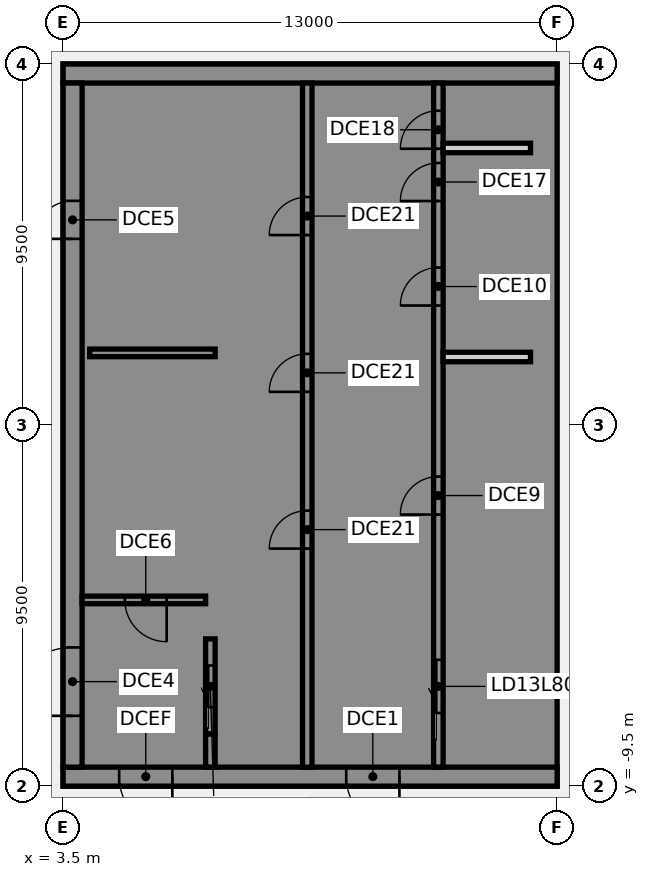
"""IFC4 building model, lengths in metres.
Left out: names, types, materials, properties, quantities, classifications, styles, units other than length and angle.
Written with IfcOpenShell. Run it as: python <this file> out.ifc"""

import sys

from ifc_helpers import new_model, si_unit, direction, frame, frame_2d, origin, place, context, subcontext, project, spatial, polyline, rectangle, outline, extrude, element, fill, save


model = new_model("IFC4")
c1 = context("Model", 3, precision=1e-05, world=origin(), true_north=direction((0.0, 1.0)))
c2 = subcontext(c1, "Body", "Model", "MODEL_VIEW")
j1 = project(units=[si_unit("LENGTHUNIT", "METRE"), si_unit("PLANEANGLEUNIT", "RADIAN")], contexts=[c1])
p1 = place(None, origin())
s1 = spatial("IfcSite", under=j1, at=p1, CompositionType="ELEMENT")
p2 = place(p1, origin())
s2 = spatial("IfcBuilding", under=s1, at=p2, CompositionType="ELEMENT")
p3 = place(p2, frame((0.0, 0.0, 325.4)))
s3 = spatial("IfcBuildingStorey", under=s2, at=p3, CompositionType="ELEMENT", Elevation=325.4)
p4 = place(p3, frame((16.5, -9.25, 0.0), z_axis=(0.0, 0.0, 1.0), x_axis=(-1.0, 0.0, 0.0)))
e1 = element("IfcWall", 1, at=p4, inside=s3, PredefinedType="SHEAR", context=c2, shape_type="SweptSolid", body=[
    extrude(rectangle(XDim=13.0, YDim=0.5, at=frame_2d((6.5, 0.0))), origin(), (0.0, 0.0, 1.0), 3.8),
])
p5 = place(p4, frame((4.15, 0.0, 0.0)))
e2 = element("IfcOpeningElement", 2, at=p5, cuts=e1, PredefinedType="OPENING", context=c2, shape_type="SweptSolid", body=[
    extrude(rectangle(XDim=1.4, YDim=2.1, at=frame_2d((0.7, 1.05))), frame((0.0, 0.26, 0.0), z_axis=(0.0, -1.0, 0.0), x_axis=(1.0, 0.0, 0.0)), (0.0, 0.0, 1.0), 0.52),
])
p6 = place(p4, frame((10.125, 0.0, 0.0)))
e3 = element("IfcOpeningElement", 3, at=p6, cuts=e1, PredefinedType="OPENING", context=c2, shape_type="SweptSolid", body=[
    extrude(rectangle(XDim=1.4, YDim=2.1, at=frame_2d((0.7, 1.05))), frame((0.0, 0.26, 0.0), z_axis=(0.0, -1.0, 0.0), x_axis=(1.0, 0.0, 0.0)), (0.0, 0.0, 1.0), 0.52),
])
p7 = place(p3, origin())
e4 = element("IfcWall", 4, at=p7, inside=s3, PredefinedType="SHEAR", context=c2, shape_type="SweptSolid", body=[
    extrude(outline(polyline([(13.5, -8.125), (13.5, -9.0), (16.0, -9.0), (16.5, -9.0), (16.5, 9.0), (16.0, 9.0), (13.5, 9.0), (13.5, 8.125), (16.0, 8.125), (16.0, -5.375), (13.5, -5.375), (13.5, -5.625), (16.0, -5.625), (16.0, -8.125), (13.5, -8.125)])), origin(), (0.0, 0.0, 1.0), 3.8),
])
p8 = place(p3, frame((16.5, 9.25, 0.0), z_axis=(0.0, 0.0, 1.0), x_axis=(-1.0, 0.0, 0.0)))
e5 = element("IfcWall", 5, at=p8, inside=s3, PredefinedType="SHEAR", context=c2, shape_type="SweptSolid", body=[
    extrude(rectangle(XDim=13.0, YDim=0.5, at=frame_2d((6.5, 0.0))), origin(), (0.0, 0.0, 1.0), 3.8),
])
p9 = place(p3, origin())
e6 = element("IfcWall", 6, at=p9, inside=s3, PredefinedType="SHEAR", context=c2, shape_type="SweptSolid", body=[
    extrude(outline(polyline([(9.8, -5.625), (9.8, -5.375), (7.5, -5.375), (7.5, 8.125), (9.8, 8.125), (9.8, 9.0), (7.5, 9.0), (7.25, 9.0), (7.25, -5.625), (7.5, -5.625), (9.8, -5.625)])), origin(), (0.0, 0.0, 1.0), 3.8),
])
p10 = place(p3, origin())
e7 = element("IfcWall", 7, at=p10, inside=s3, PredefinedType="SHEAR", context=c2, shape_type="SweptSolid", body=[
    extrude(outline(polyline([(7.5, -8.125), (7.5, -9.0), (9.8, -9.0), (9.8, -8.125), (9.8, -5.625), (9.55, -5.625), (9.55, -8.125), (7.5, -8.125)])), origin(), (0.0, 0.0, 1.0), 3.8),
])
p11 = place(p3, frame((7.375, -9.0, 0.0), z_axis=(0.0, 0.0, 1.0), x_axis=(0.0, 1.0, 0.0)))
e8 = element("IfcWall", 8, at=p11, inside=s3, PredefinedType="SHEAR", context=c2, shape_type="SweptSolid", body=[
    extrude(rectangle(XDim=0.875, YDim=0.25, at=frame_2d((0.438, 0.0))), origin(), (0.0, 0.0, 1.0), 3.8),
])
p12 = place(p3, frame((7.5, 1.9, 0.0), z_axis=(0.0, 0.0, 1.0), x_axis=(-1.0, 0.0, 0.0)))
e9 = element("IfcWall", 9, at=p12, inside=s3, PredefinedType="SHEAR", context=c2, shape_type="SweptSolid", body=[
    extrude(rectangle(XDim=3.3, YDim=0.2, at=frame_2d((1.65, 0.0))), origin(), (0.0, 0.0, 1.0), 3.8),
])
p13 = place(p3, frame((13.375, -9.0, 0.0), z_axis=(0.0, 0.0, 1.0), x_axis=(0.0, 1.0, 0.0)))
e10 = element("IfcWall", 10, at=p13, inside=s3, PredefinedType="SHEAR", context=c2, shape_type="SweptSolid", body=[
    extrude(rectangle(XDim=18.0, YDim=0.25, at=frame_2d((9.0, 0.0))), origin(), (0.0, 0.0, 1.0), 3.8),
])
p14 = place(p13, frame((1.425, 0.0, 0.0)))
e11 = element("IfcOpeningElement", 11, at=p14, cuts=e10, PredefinedType="OPENING", context=c2, shape_type="SweptSolid", body=[
    extrude(rectangle(XDim=1.4, YDim=2.1, at=frame_2d((0.7, 1.05))), frame((0.0, 0.135, 0.0), z_axis=(0.0, -1.0, 0.0), x_axis=(1.0, 0.0, 0.0)), (0.0, 0.0, 1.0), 0.27),
])
p15 = place(p13, frame((6.646, 0.0, 0.0)))
e12 = element("IfcOpeningElement", 12, at=p15, cuts=e10, PredefinedType="OPENING", context=c2, shape_type="SweptSolid", body=[
    extrude(rectangle(XDim=1.0, YDim=2.1, at=frame_2d((0.5, 1.05))), frame((0.0, 0.135, 0.0), z_axis=(0.0, -1.0, 0.0), x_axis=(1.0, 0.0, 0.0)), (0.0, 0.0, 1.0), 0.27),
])
p16 = place(p13, frame((12.146, 0.0, 0.0)))
e13 = element("IfcOpeningElement", 13, at=p16, cuts=e10, PredefinedType="OPENING", context=c2, shape_type="SweptSolid", body=[
    extrude(rectangle(XDim=1.0, YDim=2.1, at=frame_2d((0.5, 1.05))), frame((0.0, 0.135, 0.0), z_axis=(0.0, -1.0, 0.0), x_axis=(1.0, 0.0, 0.0)), (0.0, 0.0, 1.0), 0.27),
])
p17 = place(p13, frame((14.896, 0.0, 0.0)))
e14 = element("IfcOpeningElement", 14, at=p17, cuts=e10, PredefinedType="OPENING", context=c2, shape_type="SweptSolid", body=[
    extrude(rectangle(XDim=1.0, YDim=2.1, at=frame_2d((0.5, 1.05))), frame((0.0, 0.135, 0.0), z_axis=(0.0, -1.0, 0.0), x_axis=(1.0, 0.0, 0.0)), (0.0, 0.0, 1.0), 0.27),
])
p18 = place(p13, frame((16.271, 0.0, 0.0)))
e15 = element("IfcOpeningElement", 15, at=p18, cuts=e10, PredefinedType="OPENING", context=c2, shape_type="SweptSolid", body=[
    extrude(rectangle(XDim=1.0, YDim=2.1, at=frame_2d((0.5, 1.05))), frame((0.0, 0.135, 0.0), z_axis=(0.0, -1.0, 0.0), x_axis=(1.0, 0.0, 0.0)), (0.0, 0.0, 1.0), 0.27),
])
p19 = place(p3, frame((9.925, -9.0, 0.0), z_axis=(0.0, 0.0, 1.0), x_axis=(0.0, 1.0, 0.0)))
e16 = element("IfcWall", 16, at=p19, inside=s3, PredefinedType="SHEAR", context=c2, shape_type="SweptSolid", body=[
    extrude(rectangle(XDim=18.0, YDim=0.25, at=frame_2d((9.0, 0.0))), origin(), (0.0, 0.0, 1.0), 3.8),
])
p20 = place(p19, frame((5.75, 0.0, 0.0)))
e17 = element("IfcOpeningElement", 17, at=p20, cuts=e16, PredefinedType="OPENING", context=c2, shape_type="SweptSolid", body=[
    extrude(rectangle(XDim=1.0, YDim=2.1, at=frame_2d((0.5, 1.05))), frame((0.0, 0.135, 0.0), z_axis=(0.0, -1.0, 0.0), x_axis=(1.0, 0.0, 0.0)), (0.0, 0.0, 1.0), 0.27),
])
p21 = place(p19, frame((9.875, 0.0, 0.0)))
e18 = element("IfcOpeningElement", 18, at=p21, cuts=e16, PredefinedType="OPENING", context=c2, shape_type="SweptSolid", body=[
    extrude(rectangle(XDim=1.0, YDim=2.1, at=frame_2d((0.5, 1.05))), frame((0.0, 0.135, 0.0), z_axis=(0.0, -1.0, 0.0), x_axis=(1.0, 0.0, 0.0)), (0.0, 0.0, 1.0), 0.27),
])
p22 = place(p19, frame((14.0, 0.0, 0.0)))
e19 = element("IfcOpeningElement", 19, at=p22, cuts=e16, PredefinedType="OPENING", context=c2, shape_type="SweptSolid", body=[
    extrude(rectangle(XDim=1.0, YDim=2.1, at=frame_2d((0.5, 1.05))), frame((0.0, 0.135, 0.0), z_axis=(0.0, -1.0, 0.0), x_axis=(1.0, 0.0, 0.0)), (0.0, 0.0, 1.0), 0.27),
])
p23 = place(p3, frame((7.375, -8.125, 0.0), z_axis=(0.0, 0.0, 1.0), x_axis=(0.0, 1.0, 0.0)))
e20 = element("IfcWall", 20, at=p23, inside=s3, PredefinedType="SHEAR", context=c2, shape_type="SweptSolid", body=[
    extrude(rectangle(XDim=2.5, YDim=0.25, at=frame_2d((1.25, 0.0))), origin(), (0.0, 0.0, 1.0), 3.8),
])
p24 = place(p23, frame((0.7, 0.0, 0.0)))
e21 = element("IfcOpeningElement", 21, at=p24, cuts=e20, PredefinedType="OPENING", context=c2, shape_type="SweptSolid", body=[
    extrude(rectangle(XDim=1.1, YDim=2.1, at=frame_2d((0.55, 1.05))), frame((0.0, 0.135, 0.0), z_axis=(0.0, -1.0, 0.0), x_axis=(1.0, 0.0, 0.0)), (0.0, 0.0, 1.0), 0.27),
])
p25 = place(p3, frame((3.75, -9.0, 0.0), z_axis=(0.0, 0.0, 1.0), x_axis=(0.0, 1.0, 0.0)))
e22 = element("IfcWall", 22, at=p25, inside=s3, PredefinedType="SHEAR", context=c2, shape_type="SweptSolid", body=[
    extrude(rectangle(XDim=18.0, YDim=0.5, at=frame_2d((9.0, 0.0))), origin(), (0.0, 0.0, 1.0), 3.8),
])
p26 = place(p25, frame((1.35, 0.0, 0.0)))
e23 = element("IfcOpeningElement", 23, at=p26, cuts=e22, PredefinedType="OPENING", context=c2, shape_type="SweptSolid", body=[
    extrude(rectangle(XDim=1.8, YDim=2.1, at=frame_2d((0.9, 1.05))), frame((0.0, 0.26, 0.0), z_axis=(0.0, -1.0, 0.0), x_axis=(1.0, 0.0, 0.0)), (0.0, 0.0, 1.0), 0.52),
])
p27 = place(p25, frame((13.9, 0.0, 0.0)))
e24 = element("IfcOpeningElement", 24, at=p27, cuts=e22, PredefinedType="OPENING", context=c2, shape_type="SweptSolid", body=[
    extrude(rectangle(XDim=1.0, YDim=2.1, at=frame_2d((0.5, 1.05))), frame((0.0, 0.26, 0.0), z_axis=(0.0, -1.0, 0.0), x_axis=(1.0, 0.0, 0.0)), (0.0, 0.0, 1.0), 0.52),
])
p28 = place(p3, frame((7.25, -4.6, 0.0), z_axis=(0.0, 0.0, 1.0), x_axis=(-1.0, 0.0, 0.0)))
e25 = element("IfcWall", 25, at=p28, inside=s3, PredefinedType="SHEAR", context=c2, shape_type="SweptSolid", body=[
    extrude(rectangle(XDim=3.25, YDim=0.2, at=frame_2d((1.625, 0.0))), origin(), (0.0, 0.0, 1.0), 3.8),
])
p29 = place(p28, frame((1.025, 0.0, 0.0)))
e26 = element("IfcOpeningElement", 26, at=p29, cuts=e25, PredefinedType="OPENING", context=c2, shape_type="SweptSolid", body=[
    extrude(rectangle(XDim=1.1, YDim=2.1, at=frame_2d((0.55, 1.05))), frame((0.0, 0.11, 0.0), z_axis=(0.0, -1.0, 0.0), x_axis=(1.0, 0.0, 0.0)), (0.0, 0.0, 1.0), 0.22),
])
for number, where, z_axis, x_axis in (
    (27, (15.8, 1.792, 0.0), (0.0, 0.0, 1.0), (-1.0, 0.0, 0.0)),
    (28, (15.8, 7.292, 0.0), (0.0, 0.0, 1.0), (-1.0, 0.0, 0.0)),
):
    element("IfcWall", number, at=place(p3, frame(where, z_axis=z_axis, x_axis=x_axis)), inside=s3, PredefinedType="PARTITIONING", context=c2, shape_type="SweptSolid", body=[
        extrude(rectangle(XDim=2.3, YDim=0.25, at=frame_2d((1.15, 0.0))), origin(), (0.0, 0.0, 1.0), 3.8),
    ])
p30 = place(p5, origin())
e29 = element("IfcDoor", 29, at=p30, inside=s3, OperationType="SINGLE_SWING_LEFT", PredefinedType="DOOR", context=c2, shape_type="SweptSolid", body=[
    extrude(rectangle(XDim=1.4, YDim=2.1, at=frame_2d((0.7, 1.05))), frame((0.0, 0.025, 0.0), z_axis=(0.0, -1.0, 0.0), x_axis=(1.0, 0.0, 0.0)), (0.0, 0.0, 1.0), 0.05),
])
fill(e2, e29)
p31 = place(p6, origin())
e30 = element("IfcDoor", 30, at=p31, inside=s3, OperationType="SINGLE_SWING_LEFT", PredefinedType="DOOR", context=c2, shape_type="SweptSolid", body=[
    extrude(rectangle(XDim=1.4, YDim=2.1, at=frame_2d((0.7, 1.05))), frame((0.0, 0.025, 0.0), z_axis=(0.0, -1.0, 0.0), x_axis=(1.0, 0.0, 0.0)), (0.0, 0.0, 1.0), 0.05),
])
fill(e3, e30)
p32 = place(p26, origin())
e31 = element("IfcDoor", 31, at=p32, inside=s3, OperationType="SINGLE_SWING_LEFT", PredefinedType="DOOR", context=c2, shape_type="SweptSolid", body=[
    extrude(rectangle(XDim=1.8, YDim=2.1, at=frame_2d((0.9, 1.05))), frame((0.0, 0.025, 0.0), z_axis=(0.0, -1.0, 0.0), x_axis=(1.0, 0.0, 0.0)), (0.0, 0.0, 1.0), 0.05),
])
fill(e23, e31)
p33 = place(p27, origin())
e32 = element("IfcDoor", 32, at=p33, inside=s3, OperationType="SINGLE_SWING_LEFT", PredefinedType="DOOR", context=c2, shape_type="SweptSolid", body=[
    extrude(rectangle(XDim=1.0, YDim=2.1, at=frame_2d((0.5, 1.05))), frame((0.0, 0.025, 0.0), z_axis=(0.0, -1.0, 0.0), x_axis=(1.0, 0.0, 0.0)), (0.0, 0.0, 1.0), 0.05),
])
fill(e24, e32)
p34 = place(p29, origin())
e33 = element("IfcDoor", 33, at=p34, inside=s3, OperationType="SINGLE_SWING_LEFT", PredefinedType="DOOR", context=c2, shape_type="SweptSolid", body=[
    extrude(rectangle(XDim=1.1, YDim=2.1, at=frame_2d((0.55, 1.05))), frame((0.0, 0.025, 0.0), z_axis=(0.0, -1.0, 0.0), x_axis=(1.0, 0.0, 0.0)), (0.0, 0.0, 1.0), 0.05),
])
fill(e26, e33)
p35 = place(p14, origin())
e34 = element("IfcDoor", 34, at=p35, inside=s3, OperationType="SLIDING_TO_LEFT", PredefinedType="DOOR", context=c2, shape_type="SweptSolid", body=[
    extrude(rectangle(XDim=1.4, YDim=2.1, at=frame_2d((0.7, 1.05))), frame((0.0, 0.025, 0.0), z_axis=(0.0, -1.0, 0.0), x_axis=(1.0, 0.0, 0.0)), (0.0, 0.0, 1.0), 0.05),
])
fill(e11, e34)
p36 = place(p24, origin())
e35 = element("IfcDoor", 35, at=p36, inside=s3, OperationType="SLIDING_TO_LEFT", PredefinedType="DOOR", context=c2, shape_type="SweptSolid", body=[
    extrude(rectangle(XDim=1.1, YDim=2.1, at=frame_2d((0.55, 1.05))), frame((0.0, 0.025, 0.0), z_axis=(0.0, -1.0, 0.0), x_axis=(1.0, 0.0, 0.0)), (0.0, 0.0, 1.0), 0.05),
])
fill(e21, e35)
p37 = place(p15, origin())
e36 = element("IfcDoor", 36, at=p37, inside=s3, OperationType="SINGLE_SWING_LEFT", PredefinedType="DOOR", context=c2, shape_type="SweptSolid", body=[
    extrude(rectangle(XDim=1.0, YDim=2.1, at=frame_2d((0.5, 1.05))), frame((0.0, 0.025, 0.0), z_axis=(0.0, -1.0, 0.0), x_axis=(1.0, 0.0, 0.0)), (0.0, 0.0, 1.0), 0.05),
])
fill(e12, e36)
p38 = place(p16, origin())
e37 = element("IfcDoor", 37, at=p38, inside=s3, OperationType="SINGLE_SWING_LEFT", PredefinedType="DOOR", context=c2, shape_type="SweptSolid", body=[
    extrude(rectangle(XDim=1.0, YDim=2.1, at=frame_2d((0.5, 1.05))), frame((0.0, 0.025, 0.0), z_axis=(0.0, -1.0, 0.0), x_axis=(1.0, 0.0, 0.0)), (0.0, 0.0, 1.0), 0.05),
])
fill(e13, e37)
p39 = place(p17, origin())
e38 = element("IfcDoor", 38, at=p39, inside=s3, OperationType="SINGLE_SWING_LEFT", PredefinedType="DOOR", context=c2, shape_type="SweptSolid", body=[
    extrude(rectangle(XDim=1.0, YDim=2.1, at=frame_2d((0.5, 1.05))), frame((0.0, 0.025, 0.0), z_axis=(0.0, -1.0, 0.0), x_axis=(1.0, 0.0, 0.0)), (0.0, 0.0, 1.0), 0.05),
])
fill(e14, e38)
p40 = place(p18, origin())
e39 = element("IfcDoor", 39, at=p40, inside=s3, OperationType="SINGLE_SWING_LEFT", PredefinedType="DOOR", context=c2, shape_type="SweptSolid", body=[
    extrude(rectangle(XDim=1.0, YDim=2.1, at=frame_2d((0.5, 1.05))), frame((0.0, 0.025, 0.0), z_axis=(0.0, -1.0, 0.0), x_axis=(1.0, 0.0, 0.0)), (0.0, 0.0, 1.0), 0.05),
])
fill(e15, e39)
p41 = place(p20, origin())
e40 = element("IfcDoor", 40, at=p41, inside=s3, OperationType="SINGLE_SWING_LEFT", PredefinedType="DOOR", context=c2, shape_type="SweptSolid", body=[
    extrude(rectangle(XDim=1.0, YDim=2.1, at=frame_2d((0.5, 1.05))), frame((0.0, 0.025, 0.0), z_axis=(0.0, -1.0, 0.0), x_axis=(1.0, 0.0, 0.0)), (0.0, 0.0, 1.0), 0.05),
])
fill(e17, e40)
p42 = place(p21, origin())
e41 = element("IfcDoor", 41, at=p42, inside=s3, OperationType="SINGLE_SWING_LEFT", PredefinedType="DOOR", context=c2, shape_type="SweptSolid", body=[
    extrude(rectangle(XDim=1.0, YDim=2.1, at=frame_2d((0.5, 1.05))), frame((0.0, 0.025, 0.0), z_axis=(0.0, -1.0, 0.0), x_axis=(1.0, 0.0, 0.0)), (0.0, 0.0, 1.0), 0.05),
])
fill(e18, e41)
p43 = place(p22, origin())
e42 = element("IfcDoor", 42, at=p43, inside=s3, OperationType="SINGLE_SWING_LEFT", PredefinedType="DOOR", context=c2, shape_type="SweptSolid", body=[
    extrude(rectangle(XDim=1.0, YDim=2.1, at=frame_2d((0.5, 1.05))), frame((0.0, 0.025, 0.0), z_axis=(0.0, -1.0, 0.0), x_axis=(1.0, 0.0, 0.0)), (0.0, 0.0, 1.0), 0.05),
])
fill(e19, e42)
save(model, sys.argv[1])
